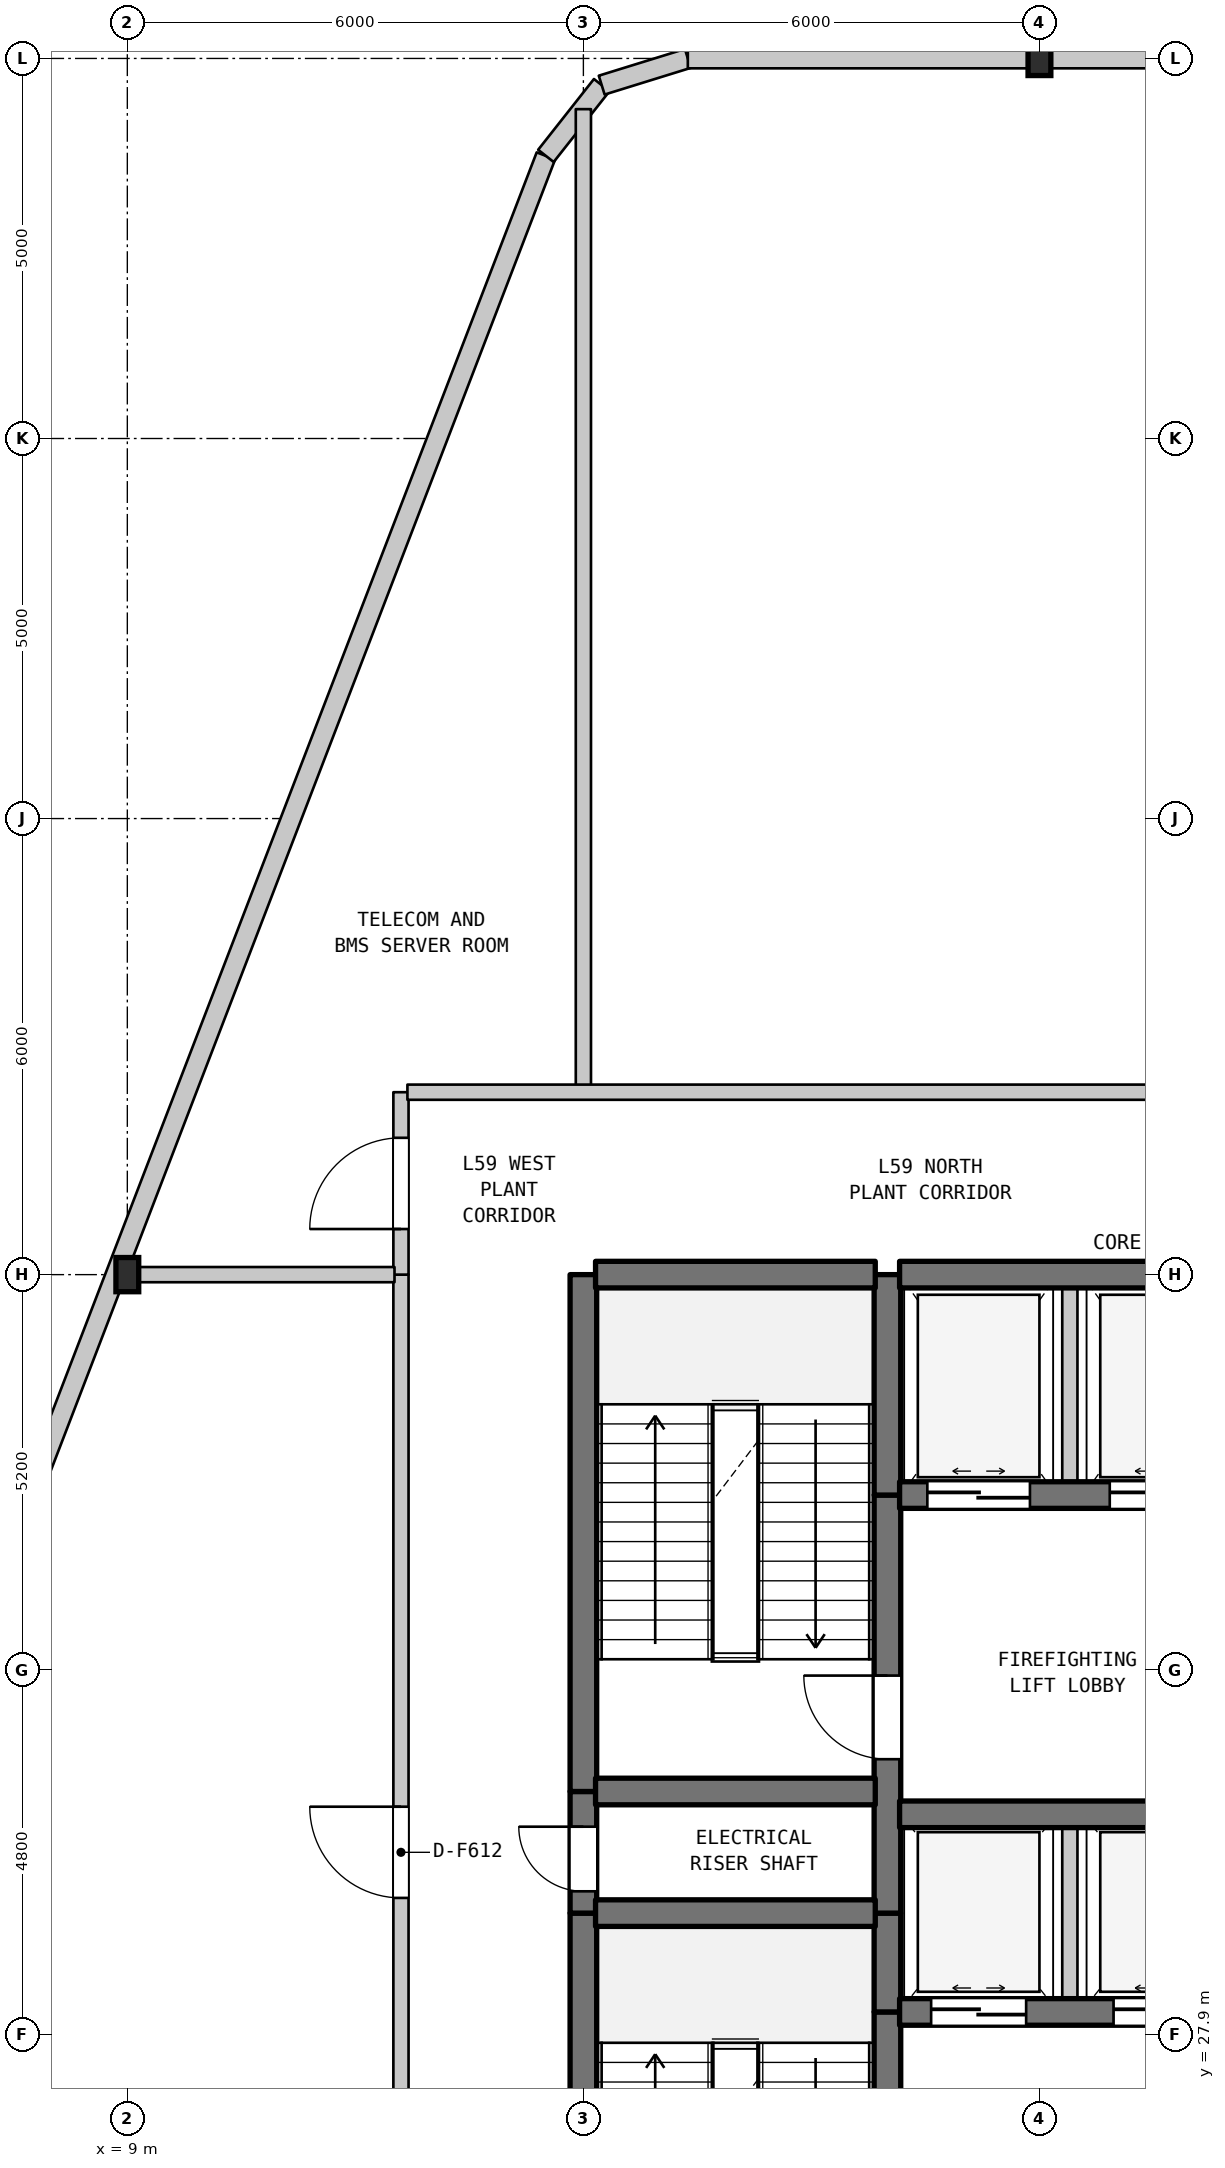
"""IFC4 building model, lengths in metres.
Left out: names, types, materials, properties, quantities, classifications, styles, units other than length and angle.
Written with IfcOpenShell. Run it as: python <this file> out.ifc"""

import sys

from ifc_helpers import new_model, si_unit, direction, frame, frame_2d, origin, origin_2d, place, context, subcontext, project, spatial, rectangle, i_section, extrude, element, fill, save


model = new_model("IFC4")
c1 = context("Model", 3, precision=1e-05, world=origin(), true_north=direction((0.0, 1.0)))
c2 = subcontext(c1, "Body", "Model", "MODEL_VIEW")
j1 = project(units=[si_unit("LENGTHUNIT", "METRE"), si_unit("PLANEANGLEUNIT", "RADIAN")], contexts=[c1])
p1 = place(None, origin())
s1 = spatial("IfcSite", under=j1, at=p1, CompositionType="ELEMENT")
p2 = place(p1, origin())
s2 = spatial("IfcBuilding", under=s1, at=p2, CompositionType="ELEMENT")
p3 = place(p2, frame((0.0, 0.0, 237.6)))
s3 = spatial("IfcBuildingStorey", under=s2, at=p3, CompositionType="ELEMENT", Elevation=237.6)
for number, where, z_axis, x_axis in (
    (1, (9.0, 37.9, 0.0), (0.0, 0.0, 1.0), (1.0, 0.0, 0.0)),
    (2, (21.0, 53.9, 0.0), (0.0, 0.0, 1.0), (1.0, 0.0, 0.0)),
):
    element("IfcColumn", number, at=place(p3, frame(where, z_axis=z_axis, x_axis=x_axis)), inside=s3, PredefinedType="COLUMN", context=c2, shape_type="SweptSolid", body=[
        extrude(i_section(OverallWidth=0.3, OverallDepth=0.45, WebThickness=0.014, FlangeThickness=0.026, FilletRadius=0.027, at=origin_2d()), origin(), (0.0, 0.0, 1.0), 5.2),
    ])
p4 = place(p3, frame((3.497, 23.993, 0.0), z_axis=(0.0, 0.0, 1.0), x_axis=(0.358990281293, 0.93334129767, 0.0)))
e3 = element("IfcWall", 3, at=p4, inside=s3, PredefinedType="STANDARD", context=c2, shape_type="SweptSolid", body=[
    extrude(rectangle(XDim=30.669, YDim=0.26, at=frame_2d((15.335, 0.0))), origin(), (0.0, 0.0, 1.0), 4.88),
])
p5 = place(p3, frame((14.507, 52.618, 0.0), z_axis=(0.0, 0.0, 1.0), x_axis=(0.619003121736, 0.78538852505, 0.0)))
e4 = element("IfcWall", 4, at=p5, inside=s3, PredefinedType="STANDARD", context=c2, shape_type="SweptSolid", body=[
    extrude(rectangle(XDim=1.186, YDim=0.26, at=frame_2d((0.593, 0.0))), origin(), (0.0, 0.0, 1.0), 4.88),
])
p6 = place(p3, frame((15.241, 53.549, 0.0), z_axis=(0.0, 0.0, 1.0), x_axis=(0.955256816454, 0.295777643879, 0.0)))
e5 = element("IfcWall", 5, at=p6, inside=s3, PredefinedType="STANDARD", context=c2, shape_type="SweptSolid", body=[
    extrude(rectangle(XDim=1.186, YDim=0.26, at=frame_2d((0.593, 0.0))), origin(), (0.0, 0.0, 1.0), 4.88),
])
p7 = place(p3, frame((16.374, 53.9, 0.0), z_axis=(0.0, 0.0, 1.0), x_axis=(1.0, 0.0, 0.0)))
e6 = element("IfcWall", 6, at=p7, inside=s3, PredefinedType="STANDARD", context=c2, shape_type="SweptSolid", body=[
    extrude(rectangle(XDim=4.626, YDim=0.26, at=frame_2d((2.313, 0.0))), origin(), (0.0, 0.0, 1.0), 4.88),
])
p8 = place(p3, frame((12.6, 22.7, 0.0), z_axis=(0.0, 0.0, 1.0), x_axis=(0.0, 1.0, 0.0)))
e7 = element("IfcWall", 7, at=p8, inside=s3, PredefinedType="STANDARD", context=c2, shape_type="SweptSolid", body=[
    extrude(rectangle(XDim=15.2, YDim=0.2, at=frame_2d((7.6, 0.0))), origin(), (0.0, 0.0, 1.0), 4.88),
])
p9 = place(p8, frame((7.0, 0.0, 0.0)))
e8 = element("IfcOpeningElement", 8, at=p9, cuts=e7, PredefinedType="OPENING", context=c2, shape_type="SweptSolid", body=[
    extrude(rectangle(XDim=1.2, YDim=2.2, at=frame_2d((0.6, 1.1))), frame((0.0, 0.11, 0.0), z_axis=(0.0, -1.0, 0.0), x_axis=(1.0, 0.0, 0.0)), (0.0, 0.0, 1.0), 0.22),
])
p10 = place(p3, frame((12.6, 37.9, 0.0), z_axis=(0.0, 0.0, 1.0), x_axis=(0.0, 1.0, 0.0)))
e9 = element("IfcWall", 9, at=p10, inside=s3, PredefinedType="STANDARD", context=c2, shape_type="SweptSolid", body=[
    extrude(rectangle(XDim=2.4, YDim=0.2, at=frame_2d((1.2, 0.0))), origin(), (0.0, 0.0, 1.0), 4.88),
])
p11 = place(p10, frame((0.6, 0.0, 0.0)))
e10 = element("IfcOpeningElement", 10, at=p11, cuts=e9, PredefinedType="OPENING", context=c2, shape_type="SweptSolid", body=[
    extrude(rectangle(XDim=1.2, YDim=2.2, at=frame_2d((0.6, 1.1))), frame((0.0, 0.11, 0.0), z_axis=(0.0, -1.0, 0.0), x_axis=(1.0, 0.0, 0.0)), (0.0, 0.0, 1.0), 0.22),
])
p12 = place(p3, frame((15.0, 22.7, 0.0), z_axis=(0.0, 0.0, 1.0), x_axis=(0.0, 1.0, 0.0)))
e11 = element("IfcWall", 11, at=p12, inside=s3, PredefinedType="SHEAR", context=c2, shape_type="SweptSolid", body=[
    extrude(rectangle(XDim=6.8, YDim=0.35, at=frame_2d((3.4, 0.0))), origin(), (0.0, 0.0, 1.0), 4.88),
])
p13 = place(p3, frame((15.0, 29.5, 0.0), z_axis=(0.0, 0.0, 1.0), x_axis=(0.0, 1.0, 0.0)))
e12 = element("IfcWall", 12, at=p13, inside=s3, PredefinedType="SHEAR", context=c2, shape_type="SweptSolid", body=[
    extrude(rectangle(XDim=1.6, YDim=0.35, at=frame_2d((0.8, 0.0))), origin(), (0.0, 0.0, 1.0), 4.88),
])
p14 = place(p13, frame((0.287, 0.0, 0.0)))
e13 = element("IfcOpeningElement", 13, at=p14, cuts=e12, PredefinedType="OPENING", context=c2, shape_type="SweptSolid", body=[
    extrude(rectangle(XDim=0.85, YDim=2.1, at=frame_2d((0.425, 1.05))), frame((0.0, 0.185, 0.0), z_axis=(0.0, -1.0, 0.0), x_axis=(1.0, 0.0, 0.0)), (0.0, 0.0, 1.0), 0.37),
])
p15 = place(p3, frame((15.0, 31.1, 0.0), z_axis=(0.0, 0.0, 1.0), x_axis=(0.0, 1.0, 0.0)))
e14 = element("IfcWall", 14, at=p15, inside=s3, PredefinedType="SHEAR", context=c2, shape_type="SweptSolid", body=[
    extrude(rectangle(XDim=6.8, YDim=0.35, at=frame_2d((3.4, 0.0))), origin(), (0.0, 0.0, 1.0), 4.88),
])
p16 = place(p3, frame((15.0, 40.3, 0.0), z_axis=(0.0, 0.0, 1.0), x_axis=(0.0, 1.0, 0.0)))
e15 = element("IfcWall", 15, at=p16, inside=s3, PredefinedType="STANDARD", context=c2, shape_type="SweptSolid", body=[
    extrude(rectangle(XDim=12.933, YDim=0.2, at=frame_2d((6.466, 0.0))), origin(), (0.0, 0.0, 1.0), 4.88),
])
p17 = place(p3, frame((19.0, 22.7, 0.0), z_axis=(0.0, 0.0, 1.0), x_axis=(0.0, 1.0, 0.0)))
e16 = element("IfcWall", 16, at=p17, inside=s3, PredefinedType="SHEAR", context=c2, shape_type="SweptSolid", body=[
    extrude(rectangle(XDim=5.5, YDim=0.35, at=frame_2d((2.75, 0.0))), origin(), (0.0, 0.0, 1.0), 4.88),
])
p18 = place(p17, frame((0.631, 0.0, 0.0)))
e17 = element("IfcOpeningElement", 17, at=p18, cuts=e16, PredefinedType="OPENING", context=c2, shape_type="SweptSolid", body=[
    extrude(rectangle(XDim=1.1, YDim=2.15, at=frame_2d((0.55, 1.075))), frame((0.0, 0.185, 0.0), z_axis=(0.0, -1.0, 0.0), x_axis=(1.0, 0.0, 0.0)), (0.0, 0.0, 1.0), 0.37),
])
p19 = place(p3, frame((19.0, 28.2, 0.0), z_axis=(0.0, 0.0, 1.0), x_axis=(0.0, 1.0, 0.0)))
e18 = element("IfcWall", 18, at=p19, inside=s3, PredefinedType="SHEAR", context=c2, shape_type="SweptSolid", body=[
    extrude(rectangle(XDim=1.3, YDim=0.35, at=frame_2d((0.65, 0.0))), origin(), (0.0, 0.0, 1.0), 4.88),
])
p20 = place(p3, frame((19.0, 29.5, 0.0), z_axis=(0.0, 0.0, 1.0), x_axis=(0.0, 1.0, 0.0)))
e19 = element("IfcWall", 19, at=p20, inside=s3, PredefinedType="SHEAR", context=c2, shape_type="SweptSolid", body=[
    extrude(rectangle(XDim=5.5, YDim=0.35, at=frame_2d((2.75, 0.0))), origin(), (0.0, 0.0, 1.0), 4.88),
])
p21 = place(p20, frame((2.025, 0.0, 0.0)))
e20 = element("IfcOpeningElement", 20, at=p21, cuts=e19, PredefinedType="OPENING", context=c2, shape_type="SweptSolid", body=[
    extrude(rectangle(XDim=1.1, YDim=2.15, at=frame_2d((0.55, 1.075))), frame((0.0, 0.185, 0.0), z_axis=(0.0, -1.0, 0.0), x_axis=(1.0, 0.0, 0.0)), (0.0, 0.0, 1.0), 0.37),
])
p22 = place(p3, frame((19.0, 35.0, 0.0), z_axis=(0.0, 0.0, 1.0), x_axis=(0.0, 1.0, 0.0)))
e21 = element("IfcWall", 21, at=p22, inside=s3, PredefinedType="SHEAR", context=c2, shape_type="SweptSolid", body=[
    extrude(rectangle(XDim=2.9, YDim=0.35, at=frame_2d((1.45, 0.0))), origin(), (0.0, 0.0, 1.0), 4.88),
])
p23 = place(p3, frame((21.4, 28.2, 0.0), z_axis=(0.0, 0.0, 1.0), x_axis=(0.0, 1.0, 0.0)))
e22 = element("IfcWall", 22, at=p23, inside=s3, PredefinedType="STANDARD", context=c2, shape_type="SweptSolid", body=[
    extrude(rectangle(XDim=2.6, YDim=0.2, at=frame_2d((1.3, 0.0))), origin(), (0.0, 0.0, 1.0), 4.88),
])
p24 = place(p3, frame((21.4, 35.0, 0.0), z_axis=(0.0, 0.0, 1.0), x_axis=(0.0, 1.0, 0.0)))
e23 = element("IfcWall", 23, at=p24, inside=s3, PredefinedType="STANDARD", context=c2, shape_type="SweptSolid", body=[
    extrude(rectangle(XDim=2.9, YDim=0.2, at=frame_2d((1.45, 0.0))), origin(), (0.0, 0.0, 1.0), 4.88),
])
p25 = place(p3, frame((19.16, 28.2, 0.0), z_axis=(0.0, 0.0, 1.0), x_axis=(1.0, 0.0, 0.0)))
e24 = element("IfcWall", 24, at=p25, inside=s3, PredefinedType="SHEAR", context=c2, shape_type="SweptSolid", body=[
    extrude(rectangle(XDim=4.48, YDim=0.35, at=frame_2d((2.24, 0.0))), origin(), (0.0, 0.0, 1.0), 4.88),
])
p26 = place(p25, frame((0.415, 0.0, 0.0)))
e25 = element("IfcOpeningElement", 25, at=p26, cuts=e24, PredefinedType="OPENING", context=c2, shape_type="SweptSolid", body=[
    extrude(rectangle(XDim=1.25, YDim=2.2, at=frame_2d((0.625, 1.1))), frame((0.0, 0.185, 0.0), z_axis=(0.0, -1.0, 0.0), x_axis=(1.0, 0.0, 0.0)), (0.0, 0.0, 1.0), 0.37),
])
p27 = place(p25, frame((2.815, 0.0, 0.0)))
e26 = element("IfcOpeningElement", 26, at=p27, cuts=e24, PredefinedType="OPENING", context=c2, shape_type="SweptSolid", body=[
    extrude(rectangle(XDim=1.25, YDim=2.2, at=frame_2d((0.625, 1.1))), frame((0.0, 0.185, 0.0), z_axis=(0.0, -1.0, 0.0), x_axis=(1.0, 0.0, 0.0)), (0.0, 0.0, 1.0), 0.37),
])
p28 = place(p3, frame((15.16, 29.5, 0.0), z_axis=(0.0, 0.0, 1.0), x_axis=(1.0, 0.0, 0.0)))
e27 = element("IfcWall", 27, at=p28, inside=s3, PredefinedType="SHEAR", context=c2, shape_type="SweptSolid", body=[
    extrude(rectangle(XDim=3.68, YDim=0.35, at=frame_2d((1.84, 0.0))), origin(), (0.0, 0.0, 1.0), 4.88),
])
p29 = place(p3, frame((19.16, 30.8, 0.0), z_axis=(0.0, 0.0, 1.0), x_axis=(1.0, 0.0, 0.0)))
e28 = element("IfcWall", 28, at=p29, inside=s3, PredefinedType="SHEAR", context=c2, shape_type="SweptSolid", body=[
    extrude(rectangle(XDim=4.48, YDim=0.35, at=frame_2d((2.24, 0.0))), origin(), (0.0, 0.0, 1.0), 4.88),
])
p30 = place(p3, frame((15.16, 31.1, 0.0), z_axis=(0.0, 0.0, 1.0), x_axis=(1.0, 0.0, 0.0)))
e29 = element("IfcWall", 29, at=p30, inside=s3, PredefinedType="SHEAR", context=c2, shape_type="SweptSolid", body=[
    extrude(rectangle(XDim=3.68, YDim=0.35, at=frame_2d((1.84, 0.0))), origin(), (0.0, 0.0, 1.0), 4.88),
])
p31 = place(p3, frame((19.16, 35.0, 0.0), z_axis=(0.0, 0.0, 1.0), x_axis=(1.0, 0.0, 0.0)))
e30 = element("IfcWall", 30, at=p31, inside=s3, PredefinedType="SHEAR", context=c2, shape_type="SweptSolid", body=[
    extrude(rectangle(XDim=4.48, YDim=0.35, at=frame_2d((2.24, 0.0))), origin(), (0.0, 0.0, 1.0), 4.88),
])
p32 = place(p31, frame((0.365, 0.0, 0.0)))
e31 = element("IfcOpeningElement", 31, at=p32, cuts=e30, PredefinedType="OPENING", context=c2, shape_type="SweptSolid", body=[
    extrude(rectangle(XDim=1.35, YDim=2.2, at=frame_2d((0.675, 1.1))), frame((0.0, 0.185, 0.0), z_axis=(0.0, -1.0, 0.0), x_axis=(1.0, 0.0, 0.0)), (0.0, 0.0, 1.0), 0.37),
])
p33 = place(p31, frame((2.765, 0.0, 0.0)))
e32 = element("IfcOpeningElement", 32, at=p33, cuts=e30, PredefinedType="OPENING", context=c2, shape_type="SweptSolid", body=[
    extrude(rectangle(XDim=1.35, YDim=2.2, at=frame_2d((0.675, 1.1))), frame((0.0, 0.185, 0.0), z_axis=(0.0, -1.0, 0.0), x_axis=(1.0, 0.0, 0.0)), (0.0, 0.0, 1.0), 0.37),
])
p34 = place(p3, frame((8.856, 37.9, 0.0), z_axis=(0.0, 0.0, 1.0), x_axis=(1.0, 0.0, 0.0)))
e33 = element("IfcWall", 33, at=p34, inside=s3, PredefinedType="STANDARD", context=c2, shape_type="SweptSolid", body=[
    extrude(rectangle(XDim=3.659, YDim=0.2, at=frame_2d((1.83, 0.0))), origin(), (0.0, 0.0, 1.0), 4.88),
])
p35 = place(p3, frame((15.16, 37.9, 0.0), z_axis=(0.0, 0.0, 1.0), x_axis=(1.0, 0.0, 0.0)))
e34 = element("IfcWall", 34, at=p35, inside=s3, PredefinedType="SHEAR", context=c2, shape_type="SweptSolid", body=[
    extrude(rectangle(XDim=3.68, YDim=0.35, at=frame_2d((1.84, 0.0))), origin(), (0.0, 0.0, 1.0), 4.88),
])
p36 = place(p3, frame((19.16, 37.9, 0.0), z_axis=(0.0, 0.0, 1.0), x_axis=(1.0, 0.0, 0.0)))
e35 = element("IfcWall", 35, at=p36, inside=s3, PredefinedType="SHEAR", context=c2, shape_type="SweptSolid", body=[
    extrude(rectangle(XDim=4.48, YDim=0.35, at=frame_2d((2.24, 0.0))), origin(), (0.0, 0.0, 1.0), 4.88),
])
p37 = place(p3, frame((12.685, 40.3, 0.0), z_axis=(0.0, 0.0, 1.0), x_axis=(1.0, 0.0, 0.0)))
e36 = element("IfcWall", 36, at=p37, inside=s3, PredefinedType="STANDARD", context=c2, shape_type="SweptSolid", body=[
    extrude(rectangle(XDim=20.23, YDim=0.2, at=frame_2d((10.115, 0.0))), origin(), (0.0, 0.0, 1.0), 4.88),
])
p38 = place(p37, frame((12.14, 0.0, 0.0)))
e37 = element("IfcOpeningElement", 37, at=p38, cuts=e36, PredefinedType="OPENING", context=c2, shape_type="SweptSolid", body=[
    extrude(rectangle(XDim=1.2, YDim=2.2, at=frame_2d((0.6, 1.1))), frame((0.0, 0.11, 0.0), z_axis=(0.0, -1.0, 0.0), x_axis=(1.0, 0.0, 0.0)), (0.0, 0.0, 1.0), 0.22),
])
p39 = place(p3, frame((21.0, 53.9, 0.0), z_axis=(0.0, 0.0, 1.0), x_axis=(1.0, 0.0, 0.0)))
e38 = element("IfcWall", 38, at=p39, inside=s3, PredefinedType="STANDARD", context=c2, shape_type="SweptSolid", body=[
    extrude(rectangle(XDim=12.0, YDim=0.26, at=frame_2d((6.0, 0.0))), origin(), (0.0, 0.0, 1.0), 4.53),
])
p40 = place(p9, origin())
e39 = element("IfcDoor", 39, at=p40, inside=s3, OperationType="SINGLE_SWING_RIGHT", PredefinedType="DOOR", context=c2, shape_type="SweptSolid", body=[
    extrude(rectangle(XDim=1.2, YDim=2.2, at=frame_2d((0.6, 1.1))), frame((0.0, 0.025, 0.0), z_axis=(0.0, -1.0, 0.0), x_axis=(1.0, 0.0, 0.0)), (0.0, 0.0, 1.0), 0.05),
])
fill(e8, e39)
p41 = place(p11, origin())
e40 = element("IfcDoor", 40, at=p41, inside=s3, OperationType="SINGLE_SWING_LEFT", PredefinedType="DOOR", context=c2, shape_type="SweptSolid", body=[
    extrude(rectangle(XDim=1.2, YDim=2.2, at=frame_2d((0.6, 1.1))), frame((0.0, 0.025, 0.0), z_axis=(0.0, -1.0, 0.0), x_axis=(1.0, 0.0, 0.0)), (0.0, 0.0, 1.0), 0.05),
])
fill(e10, e40)
p42 = place(p14, origin())
e41 = element("IfcDoor", 41, at=p42, inside=s3, OperationType="SINGLE_SWING_RIGHT", PredefinedType="DOOR", context=c2, shape_type="SweptSolid", body=[
    extrude(rectangle(XDim=0.85, YDim=2.1, at=frame_2d((0.425, 1.05))), frame((0.0, 0.025, 0.0), z_axis=(0.0, -1.0, 0.0), x_axis=(1.0, 0.0, 0.0)), (0.0, 0.0, 1.0), 0.05),
])
fill(e13, e41)
p43 = place(p21, origin())
e42 = element("IfcDoor", 42, at=p43, inside=s3, OperationType="SINGLE_SWING_RIGHT", PredefinedType="DOOR", context=c2, shape_type="SweptSolid", body=[
    extrude(rectangle(XDim=1.1, YDim=2.15, at=frame_2d((0.55, 1.075))), frame((0.0, 0.025, 0.0), z_axis=(0.0, -1.0, 0.0), x_axis=(1.0, 0.0, 0.0)), (0.0, 0.0, 1.0), 0.05),
])
fill(e20, e42)
p44 = place(p26, origin())
e43 = element("IfcDoor", 43, at=p44, inside=s3, OperationType="DOUBLE_DOOR_SLIDING", PredefinedType="DOOR", context=c2, shape_type="SweptSolid", body=[
    extrude(rectangle(XDim=1.25, YDim=2.2, at=frame_2d((0.625, 1.1))), frame((0.0, 0.025, 0.0), z_axis=(0.0, -1.0, 0.0), x_axis=(1.0, 0.0, 0.0)), (0.0, 0.0, 1.0), 0.05),
])
fill(e25, e43)
p45 = place(p27, origin())
e44 = element("IfcDoor", 44, at=p45, inside=s3, OperationType="DOUBLE_DOOR_SLIDING", PredefinedType="DOOR", context=c2, shape_type="SweptSolid", body=[
    extrude(rectangle(XDim=1.25, YDim=2.2, at=frame_2d((0.625, 1.1))), frame((0.0, 0.025, 0.0), z_axis=(0.0, -1.0, 0.0), x_axis=(1.0, 0.0, 0.0)), (0.0, 0.0, 1.0), 0.05),
])
fill(e26, e44)
p46 = place(p32, origin())
e45 = element("IfcDoor", 45, at=p46, inside=s3, OperationType="DOUBLE_DOOR_SLIDING", PredefinedType="DOOR", context=c2, shape_type="SweptSolid", body=[
    extrude(rectangle(XDim=1.35, YDim=2.2, at=frame_2d((0.675, 1.1))), frame((0.0, 0.025, 0.0), z_axis=(0.0, -1.0, 0.0), x_axis=(1.0, 0.0, 0.0)), (0.0, 0.0, 1.0), 0.05),
])
fill(e31, e45)
p47 = place(p33, origin())
e46 = element("IfcDoor", 46, at=p47, inside=s3, OperationType="DOUBLE_DOOR_SLIDING", PredefinedType="DOOR", context=c2, shape_type="SweptSolid", body=[
    extrude(rectangle(XDim=1.35, YDim=2.2, at=frame_2d((0.675, 1.1))), frame((0.0, 0.025, 0.0), z_axis=(0.0, -1.0, 0.0), x_axis=(1.0, 0.0, 0.0)), (0.0, 0.0, 1.0), 0.05),
])
fill(e32, e46)
save(model, sys.argv[1])
